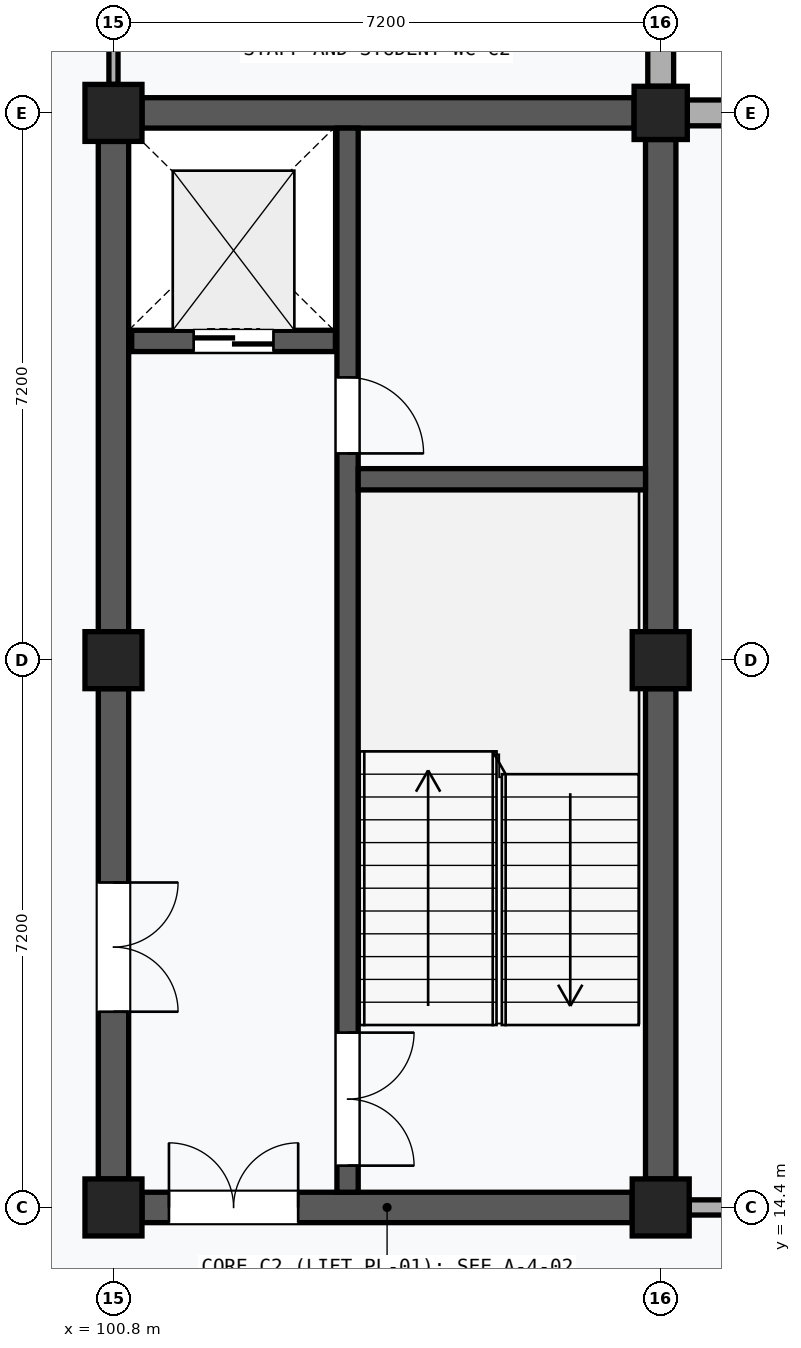
"""IFC4 building model, lengths in metres.
Left out: names, types, materials, properties, quantities, classifications, styles, units other than length and angle.
Written with IfcOpenShell. Run it as: python <this file> out.ifc"""

import sys

from ifc_helpers import new_model, si_unit, direction, frame, frame_2d, origin, origin_2d, place, context, subcontext, project, spatial, rectangle, extrude, element, fill, save


model = new_model("IFC4")
c1 = context("Model", 3, precision=1e-05, world=origin(), true_north=direction((0.0, 1.0)))
c2 = subcontext(c1, "Body", "Model", "MODEL_VIEW")
j1 = project(units=[si_unit("LENGTHUNIT", "METRE"), si_unit("PLANEANGLEUNIT", "RADIAN")], contexts=[c1])
p1 = place(None, origin())
s1 = spatial("IfcSite", under=j1, at=p1, CompositionType="ELEMENT")
p2 = place(p1, origin())
s2 = spatial("IfcBuilding", under=s1, at=p2, CompositionType="ELEMENT")
p3 = place(p2, frame((0.0, 0.0, 18.6)))
s3 = spatial("IfcBuildingStorey", under=s2, at=p3, CompositionType="ELEMENT", Elevation=18.6)
for number, where, z_axis, x_axis in (
    (1, (100.8, 14.4, 0.0), (0.0, 0.0, 1.0), (1.0, 0.0, 0.0)),
    (2, (100.8, 21.6, 0.0), (0.0, 0.0, 1.0), (1.0, 0.0, 0.0)),
    (3, (100.8, 28.8, 0.0), (0.0, 0.0, 1.0), (1.0, 0.0, 0.0)),
    (4, (108.0, 14.4, 0.0), (0.0, 0.0, 1.0), (1.0, 0.0, 0.0)),
    (5, (108.0, 21.6, 0.0), (0.0, 0.0, 1.0), (1.0, 0.0, 0.0)),
):
    element("IfcColumn", number, at=place(p3, frame(where, z_axis=z_axis, x_axis=x_axis)), inside=s3, PredefinedType="COLUMN", context=c2, shape_type="SweptSolid", body=[
        extrude(rectangle(XDim=0.75, YDim=0.75, at=origin_2d()), origin(), (0.0, 0.0, 1.0), 4.0),
    ])
p4 = place(p3, frame((108.0, 28.8, 0.0), z_axis=(0.0, 0.0, 1.0), x_axis=(1.0, 0.0, 0.0)))
e6 = element("IfcColumn", 6, at=p4, inside=s3, PredefinedType="COLUMN", context=c2, shape_type="SweptSolid", body=[
    extrude(rectangle(XDim=0.7, YDim=0.7, at=origin_2d()), origin(), (0.0, 0.0, 1.0), 4.0),
])
p5 = place(p3, frame((108.0, 29.15, 0.0), z_axis=(0.0, 0.0, 1.0), x_axis=(0.0, 1.0, 0.0)))
e7 = element("IfcWall", 7, at=p5, inside=s3, PredefinedType="SOLIDWALL", context=c2, shape_type="SweptSolid", body=[
    extrude(rectangle(XDim=6.475, YDim=0.34, at=frame_2d((3.238, 0.0))), origin(), (0.0, 0.0, 1.0), 3.11),
])
p6 = place(p5, frame((1.538, 0.0, 0.9)))
e8 = element("IfcOpeningElement", 8, at=p6, cuts=e7, PredefinedType="OPENING", context=c2, shape_type="SweptSolid", body=[
    extrude(rectangle(XDim=3.4, YDim=1.8, at=frame_2d((1.7, 0.9))), frame((0.0, 0.182, 0.0), z_axis=(0.0, -1.0, 0.0), x_axis=(1.0, 0.0, 0.0)), (0.0, 0.0, 1.0), 0.364),
])
p7 = place(p3, frame((108.35, 28.8, 0.0), z_axis=(0.0, 0.0, 1.0), x_axis=(1.0, 0.0, 0.0)))
e9 = element("IfcWall", 9, at=p7, inside=s3, PredefinedType="SOLIDWALL", context=c2, shape_type="SweptSolid", body=[
    extrude(rectangle(XDim=6.6, YDim=0.34, at=frame_2d((3.3, 0.0))), origin(), (0.0, 0.0, 1.0), 3.11),
])
p8 = place(p7, frame((1.6, 0.0, 0.9)))
e10 = element("IfcOpeningElement", 10, at=p8, cuts=e9, PredefinedType="OPENING", context=c2, shape_type="SweptSolid", body=[
    extrude(rectangle(XDim=3.4, YDim=1.8, at=frame_2d((1.7, 0.9))), frame((0.0, 0.182, 0.0), z_axis=(0.0, -1.0, 0.0), x_axis=(1.0, 0.0, 0.0)), (0.0, 0.0, 1.0), 0.364),
])
p9 = place(p3, frame((100.8, 14.775, 0.0), z_axis=(0.0, 0.0, 1.0), x_axis=(0.0, 1.0, 0.0)))
e11 = element("IfcWall", 11, at=p9, inside=s3, PredefinedType="SHEAR", context=c2, shape_type="SweptSolid", body=[
    extrude(rectangle(XDim=6.45, YDim=0.4, at=frame_2d((3.225, 0.0))), origin(), (0.0, 0.0, 1.0), 2.97),
])
p10 = place(p9, frame((2.2, 0.0, 0.0)))
e12 = element("IfcOpeningElement", 12, at=p10, cuts=e11, PredefinedType="OPENING", context=c2, shape_type="SweptSolid", body=[
    extrude(rectangle(XDim=1.7, YDim=2.25, at=frame_2d((0.85, 1.125))), frame((0.0, 0.212, 0.0), z_axis=(0.0, -1.0, 0.0), x_axis=(1.0, 0.0, 0.0)), (0.0, 0.0, 1.0), 0.424),
])
p11 = place(p3, frame((100.8, 21.975, 0.0), z_axis=(0.0, 0.0, 1.0), x_axis=(0.0, 1.0, 0.0)))
e13 = element("IfcWall", 13, at=p11, inside=s3, PredefinedType="SHEAR", context=c2, shape_type="SweptSolid", body=[
    extrude(rectangle(XDim=6.45, YDim=0.4, at=frame_2d((3.225, 0.0))), origin(), (0.0, 0.0, 1.0), 2.97),
])
p12 = place(p3, frame((108.0, 14.775, 0.0), z_axis=(0.0, 0.0, 1.0), x_axis=(0.0, 1.0, 0.0)))
e14 = element("IfcWall", 14, at=p12, inside=s3, PredefinedType="SHEAR", context=c2, shape_type="SweptSolid", body=[
    extrude(rectangle(XDim=6.45, YDim=0.4, at=frame_2d((3.225, 0.0))), origin(), (0.0, 0.0, 1.0), 2.97),
])
p13 = place(p3, frame((108.0, 21.975, 0.0), z_axis=(0.0, 0.0, 1.0), x_axis=(0.0, 1.0, 0.0)))
e15 = element("IfcWall", 15, at=p13, inside=s3, PredefinedType="SHEAR", context=c2, shape_type="SweptSolid", body=[
    extrude(rectangle(XDim=6.475, YDim=0.4, at=frame_2d((3.237, 0.0))), origin(), (0.0, 0.0, 1.0), 2.97),
])
p14 = place(p3, frame((101.175, 14.4, 0.0), z_axis=(0.0, 0.0, 1.0), x_axis=(1.0, 0.0, 0.0)))
e16 = element("IfcWall", 16, at=p14, inside=s3, PredefinedType="SHEAR", context=c2, shape_type="SweptSolid", body=[
    extrude(rectangle(XDim=6.45, YDim=0.4, at=frame_2d((3.225, 0.0))), origin(), (0.0, 0.0, 1.0), 3.04),
])
p15 = place(p14, frame((0.355, 0.0, 0.0)))
e17 = element("IfcOpeningElement", 17, at=p15, cuts=e16, PredefinedType="OPENING", context=c2, shape_type="SweptSolid", body=[
    extrude(rectangle(XDim=1.7, YDim=2.25, at=frame_2d((0.85, 1.125))), frame((0.0, 0.212, 0.0), z_axis=(0.0, -1.0, 0.0), x_axis=(1.0, 0.0, 0.0)), (0.0, 0.0, 1.0), 0.424),
])
p16 = place(p3, frame((101.175, 28.8, 0.0), z_axis=(0.0, 0.0, 1.0), x_axis=(1.0, 0.0, 0.0)))
e18 = element("IfcWall", 18, at=p16, inside=s3, PredefinedType="SHEAR", context=c2, shape_type="SweptSolid", body=[
    extrude(rectangle(XDim=6.475, YDim=0.4, at=frame_2d((3.237, 0.0))), origin(), (0.0, 0.0, 1.0), 2.97),
])
p17 = place(p3, frame((103.88, 14.6, 0.0), z_axis=(0.0, 0.0, 1.0), x_axis=(0.0, 1.0, 0.0)))
e19 = element("IfcWall", 19, at=p17, inside=s3, PredefinedType="SHEAR", context=c2, shape_type="SweptSolid", body=[
    extrude(rectangle(XDim=14.0, YDim=0.28, at=frame_2d((7.0, 0.0))), origin(), (0.0, 0.0, 1.0), 3.74),
])
p18 = place(p17, frame((0.35, 0.0, 0.0)))
e20 = element("IfcOpeningElement", 20, at=p18, cuts=e19, PredefinedType="OPENING", context=c2, shape_type="SweptSolid", body=[
    extrude(rectangle(XDim=1.75, YDim=2.15, at=frame_2d((0.875, 1.075))), frame((0.0, 0.152, 0.0), z_axis=(0.0, -1.0, 0.0), x_axis=(1.0, 0.0, 0.0)), (0.0, 0.0, 1.0), 0.304),
])
p19 = place(p17, frame((9.72, 0.0, 0.0)))
e21 = element("IfcOpeningElement", 21, at=p19, cuts=e19, PredefinedType="OPENING", context=c2, shape_type="SweptSolid", body=[
    extrude(rectangle(XDim=1.0, YDim=2.15, at=frame_2d((0.5, 1.075))), frame((0.0, 0.152, 0.0), z_axis=(0.0, -1.0, 0.0), x_axis=(1.0, 0.0, 0.0)), (0.0, 0.0, 1.0), 0.304),
])
p20 = place(p3, frame((104.02, 23.98, 0.0), z_axis=(0.0, 0.0, 1.0), x_axis=(1.0, 0.0, 0.0)))
e22 = element("IfcWall", 22, at=p20, inside=s3, PredefinedType="SHEAR", context=c2, shape_type="SweptSolid", body=[
    extrude(rectangle(XDim=3.78, YDim=0.28, at=frame_2d((1.89, 0.0))), origin(), (0.0, 0.0, 1.0), 3.74),
])
p21 = place(p3, frame((101.04, 25.8, 0.0), z_axis=(0.0, 0.0, 1.0), x_axis=(1.0, 0.0, 0.0)))
e23 = element("IfcWall", 23, at=p21, inside=s3, PredefinedType="SHEAR", context=c2, shape_type="SweptSolid", body=[
    extrude(rectangle(XDim=2.68, YDim=0.28, at=frame_2d((1.34, 0.0))), origin(), (0.0, 0.0, 1.0), 3.74),
])
p22 = place(p21, frame((0.815, 0.0, 0.0)))
e24 = element("IfcOpeningElement", 24, at=p22, cuts=e23, PredefinedType="OPENING", context=c2, shape_type="SweptSolid", body=[
    extrude(rectangle(XDim=1.05, YDim=2.2, at=frame_2d((0.525, 1.1))), frame((0.0, 0.152, 0.0), z_axis=(0.0, -1.0, 0.0), x_axis=(1.0, 0.0, 0.0)), (0.0, 0.0, 1.0), 0.304),
])
p23 = place(p3, frame((108.375, 14.4, 0.0), z_axis=(0.0, 0.0, 1.0), x_axis=(1.0, 0.0, 0.0)))
e25 = element("IfcWall", 25, at=p23, inside=s3, PredefinedType="PARTITIONING", context=c2, shape_type="SweptSolid", body=[
    extrude(rectangle(XDim=6.45, YDim=0.2, at=frame_2d((3.225, 0.0))), origin(), (0.0, 0.0, 1.0), 2.97),
])
p24 = place(p23, frame((2.715, 0.0, 0.0)))
e26 = element("IfcOpeningElement", 26, at=p24, cuts=e25, PredefinedType="OPENING", context=c2, shape_type="SweptSolid", body=[
    extrude(rectangle(XDim=1.02, YDim=2.12, at=frame_2d((0.51, 1.06))), frame((0.0, 0.112, 0.0), z_axis=(0.0, -1.0, 0.0), x_axis=(1.0, 0.0, 0.0)), (0.0, 0.0, 1.0), 0.224),
])
p25 = place(p3, frame((100.8, 29.175, 0.0), z_axis=(0.0, 0.0, 1.0), x_axis=(0.0, 1.0, 0.0)))
e27 = element("IfcWall", 27, at=p25, inside=s3, PredefinedType="MOVABLE", context=c2, shape_type="SweptSolid", body=[
    extrude(rectangle(XDim=6.45, YDim=0.12, at=frame_2d((3.225, 0.0))), origin(), (0.0, 0.0, 1.0), 2.97),
])
p26 = place(p25, frame((2.625, 0.0, 0.0)))
e28 = element("IfcOpeningElement", 28, at=p26, cuts=e27, PredefinedType="OPENING", context=c2, shape_type="SweptSolid", body=[
    extrude(rectangle(XDim=1.2, YDim=2.24, at=frame_2d((0.6, 1.12))), frame((0.0, 0.072, 0.0), z_axis=(0.0, -1.0, 0.0), x_axis=(1.0, 0.0, 0.0)), (0.0, 0.0, 1.0), 0.144),
])
p27 = place(p10, frame((1.7, 0.0, 0.0), z_axis=(0.0, 0.0, 1.0), x_axis=(-1.0, 0.0, 0.0)))
e29 = element("IfcDoor", 29, at=p27, inside=s3, OperationType="DOUBLE_DOOR_SINGLE_SWING", PredefinedType="DOOR", context=c2, shape_type="SweptSolid", body=[
    extrude(rectangle(XDim=1.7, YDim=2.25, at=frame_2d((0.85, 1.125))), frame((0.0, 0.025, 0.0), z_axis=(0.0, -1.0, 0.0), x_axis=(1.0, 0.0, 0.0)), (0.0, 0.0, 1.0), 0.05),
])
fill(e12, e29)
p28 = place(p15, origin())
e30 = element("IfcDoor", 30, at=p28, inside=s3, OperationType="DOUBLE_DOOR_SINGLE_SWING", PredefinedType="DOOR", context=c2, shape_type="SweptSolid", body=[
    extrude(rectangle(XDim=1.7, YDim=2.25, at=frame_2d((0.85, 1.125))), frame((0.0, 0.025, 0.0), z_axis=(0.0, -1.0, 0.0), x_axis=(1.0, 0.0, 0.0)), (0.0, 0.0, 1.0), 0.05),
])
fill(e17, e30)
p29 = place(p18, frame((1.75, 0.0, 0.0), z_axis=(0.0, 0.0, 1.0), x_axis=(-1.0, 0.0, 0.0)))
e31 = element("IfcDoor", 31, at=p29, inside=s3, OperationType="DOUBLE_DOOR_SINGLE_SWING", PredefinedType="DOOR", context=c2, shape_type="SweptSolid", body=[
    extrude(rectangle(XDim=1.75, YDim=2.15, at=frame_2d((0.875, 1.075))), frame((0.0, 0.025, 0.0), z_axis=(0.0, -1.0, 0.0), x_axis=(1.0, 0.0, 0.0)), (0.0, 0.0, 1.0), 0.05),
])
fill(e20, e31)
p30 = place(p19, frame((1.0, 0.0, 0.0), z_axis=(0.0, 0.0, 1.0), x_axis=(-1.0, 0.0, 0.0)))
e32 = element("IfcDoor", 32, at=p30, inside=s3, OperationType="SINGLE_SWING_RIGHT", PredefinedType="DOOR", context=c2, shape_type="SweptSolid", body=[
    extrude(rectangle(XDim=1.0, YDim=2.15, at=frame_2d((0.5, 1.075))), frame((0.0, 0.025, 0.0), z_axis=(0.0, -1.0, 0.0), x_axis=(1.0, 0.0, 0.0)), (0.0, 0.0, 1.0), 0.05),
])
fill(e21, e32)
p31 = place(p22, frame((1.05, 0.0, 0.0), z_axis=(0.0, 0.0, 1.0), x_axis=(-1.0, 0.0, 0.0)))
e33 = element("IfcDoor", 33, at=p31, inside=s3, OperationType="DOUBLE_DOOR_SLIDING", PredefinedType="DOOR", context=c2, shape_type="SweptSolid", body=[
    extrude(rectangle(XDim=1.05, YDim=2.2, at=frame_2d((0.525, 1.1))), frame((0.0, 0.025, 0.0), z_axis=(0.0, -1.0, 0.0), x_axis=(1.0, 0.0, 0.0)), (0.0, 0.0, 1.0), 0.05),
])
fill(e24, e33)
save(model, sys.argv[1])
